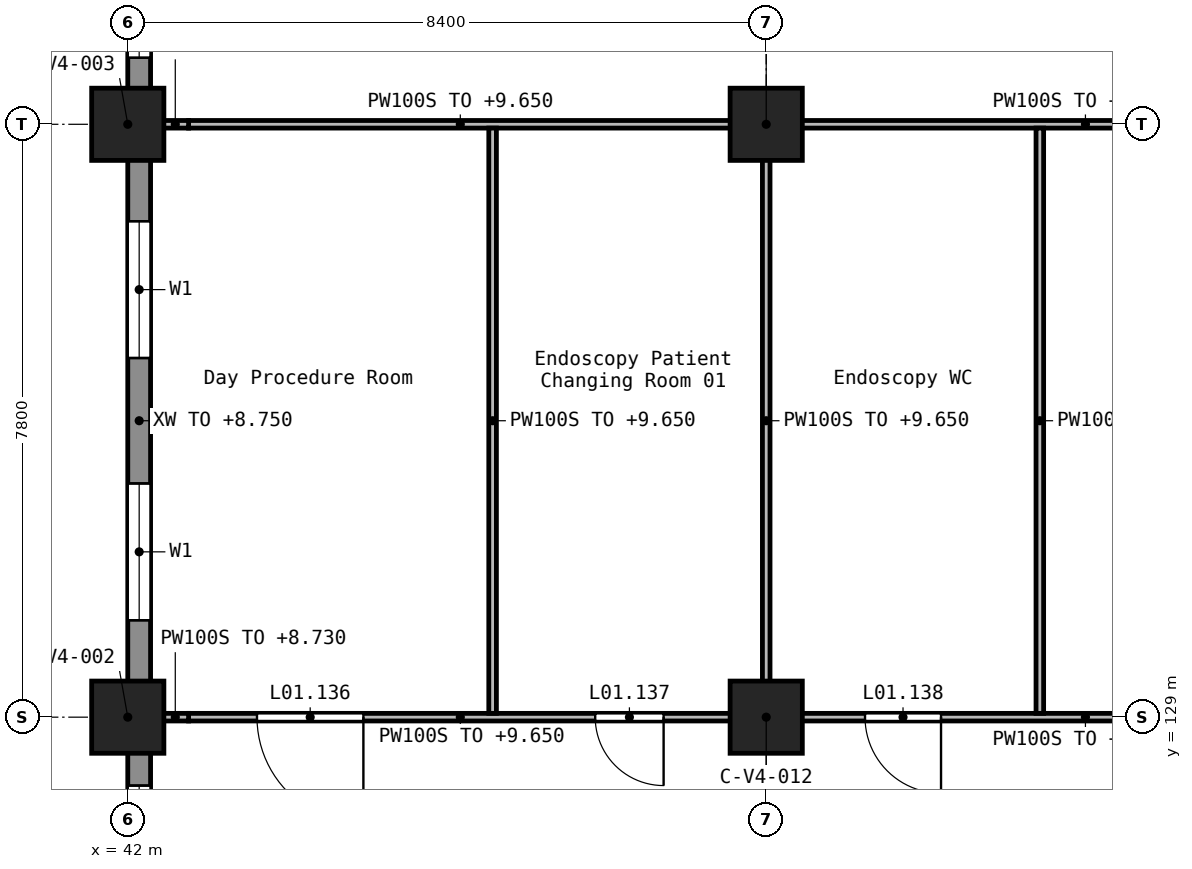
"""IFC4 building model, lengths in metres.
Left out: names, types, materials, properties, quantities, classifications, styles, units other than length and angle.
Written with IfcOpenShell. Run it as: python <this file> out.ifc"""

import sys

from ifc_helpers import new_model, si_unit, direction, frame, frame_2d, origin, origin_2d, place, context, subcontext, project, spatial, rectangle, extrude, element, fill, save


model = new_model("IFC4")
c1 = context("Model", 3, precision=1e-05, world=origin(), true_north=direction((0.0, 1.0)))
c2 = subcontext(c1, "Body", "Model", "MODEL_VIEW")
j1 = project(units=[si_unit("LENGTHUNIT", "METRE"), si_unit("PLANEANGLEUNIT", "RADIAN")], contexts=[c1])
p1 = place(None, origin())
s1 = spatial("IfcSite", under=j1, at=p1, CompositionType="ELEMENT")
p2 = place(p1, origin())
s2 = spatial("IfcBuilding", under=s1, at=p2, CompositionType="ELEMENT")
p3 = place(p2, frame((0.0, 0.0, 5.4)))
s3 = spatial("IfcBuildingStorey", under=s2, at=p3, CompositionType="ELEMENT", Elevation=5.4)
for number, where, z_axis, x_axis in (
    (1, (42.0, 129.0, 0.0), (0.0, 0.0, 1.0), (1.0, 0.0, 0.0)),
    (2, (42.0, 136.8, 0.0), (0.0, 0.0, 1.0), (1.0, 0.0, 0.0)),
    (3, (50.4, 129.0, 0.0), (0.0, 0.0, 1.0), (1.0, 0.0, 0.0)),
    (4, (50.4, 136.8, 0.0), (0.0, 0.0, 1.0), (1.0, 0.0, 0.0)),
):
    element("IfcColumn", number, at=place(p3, frame(where, z_axis=z_axis, x_axis=x_axis)), inside=s3, PredefinedType="COLUMN", context=c2, shape_type="SweptSolid", body=[
        extrude(rectangle(XDim=0.95, YDim=0.95, at=origin_2d()), origin(), (0.0, 0.0, 1.0), 4.5),
    ])
p4 = place(p3, frame((42.15, 139.9, 0.0), z_axis=(0.0, 0.0, 1.0), x_axis=(0.0, -1.0, 0.0)))
e5 = element("IfcWall", 5, at=p4, inside=s3, PredefinedType="STANDARD", context=c2, shape_type="SweptSolid", body=[
    extrude(rectangle(XDim=2.65, YDim=0.3, at=frame_2d((1.325, 0.0))), origin(), (0.0, 0.0, 1.0), 3.35),
])
p5 = place(p4, frame((0.425, 0.0, 0.9)))
e6 = element("IfcOpeningElement", 6, at=p5, cuts=e5, PredefinedType="OPENING", context=c2, shape_type="SweptSolid", body=[
    extrude(rectangle(XDim=1.8, YDim=1.5, at=frame_2d((0.9, 0.75))), frame((0.0, 0.16, 0.0), z_axis=(0.0, -1.0, 0.0), x_axis=(1.0, 0.0, 0.0)), (0.0, 0.0, 1.0), 0.32),
])
p6 = place(p3, frame((42.15, 136.35, 0.0), z_axis=(0.0, 0.0, 1.0), x_axis=(0.0, -1.0, 0.0)))
e7 = element("IfcWall", 7, at=p6, inside=s3, PredefinedType="STANDARD", context=c2, shape_type="SweptSolid", body=[
    extrude(rectangle(XDim=6.9, YDim=0.3, at=frame_2d((3.45, 0.0))), origin(), (0.0, 0.0, 1.0), 3.35),
])
p7 = place(p6, frame((0.825, 0.0, 0.9)))
e8 = element("IfcOpeningElement", 8, at=p7, cuts=e7, PredefinedType="OPENING", context=c2, shape_type="SweptSolid", body=[
    extrude(rectangle(XDim=1.8, YDim=1.5, at=frame_2d((0.9, 0.75))), frame((0.0, 0.16, 0.0), z_axis=(0.0, -1.0, 0.0), x_axis=(1.0, 0.0, 0.0)), (0.0, 0.0, 1.0), 0.32),
])
p8 = place(p6, frame((4.275, 0.0, 0.9)))
e9 = element("IfcOpeningElement", 9, at=p8, cuts=e7, PredefinedType="OPENING", context=c2, shape_type="SweptSolid", body=[
    extrude(rectangle(XDim=1.8, YDim=1.5, at=frame_2d((0.9, 0.75))), frame((0.0, 0.16, 0.0), z_axis=(0.0, -1.0, 0.0), x_axis=(1.0, 0.0, 0.0)), (0.0, 0.0, 1.0), 0.32),
])
p9 = place(p3, frame((42.15, 128.55, 0.0), z_axis=(0.0, 0.0, 1.0), x_axis=(0.0, -1.0, 0.0)))
e10 = element("IfcWall", 10, at=p9, inside=s3, PredefinedType="STANDARD", context=c2, shape_type="SweptSolid", body=[
    extrude(rectangle(XDim=2.7, YDim=0.3, at=frame_2d((1.35, 0.0))), origin(), (0.0, 0.0, 1.0), 3.35),
])
p10 = place(p9, frame((0.45, 0.0, 0.9)))
e11 = element("IfcOpeningElement", 11, at=p10, cuts=e10, PredefinedType="OPENING", context=c2, shape_type="SweptSolid", body=[
    extrude(rectangle(XDim=1.8, YDim=1.5, at=frame_2d((0.9, 0.75))), frame((0.0, 0.16, 0.0), z_axis=(0.0, -1.0, 0.0), x_axis=(1.0, 0.0, 0.0)), (0.0, 0.0, 1.0), 0.32),
])
p11 = place(p3, frame((58.35, 129.0, 0.0), z_axis=(0.0, 0.0, 1.0), x_axis=(-1.0, 0.0, 0.0)))
e12 = element("IfcWall", 12, at=p11, inside=s3, PredefinedType="PARTITIONING", context=c2, shape_type="SweptSolid", body=[
    extrude(rectangle(XDim=7.5, YDim=0.1, at=frame_2d((3.75, 0.0))), origin(), (0.0, 0.0, 1.0), 4.25),
])
p12 = place(p11, frame((5.65, 0.0, 0.0)))
e13 = element("IfcOpeningElement", 13, at=p12, cuts=e12, PredefinedType="OPENING", context=c2, shape_type="SweptSolid", body=[
    extrude(rectangle(XDim=1.0, YDim=2.1, at=frame_2d((0.5, 1.05))), frame((0.0, 0.06, 0.0), z_axis=(0.0, -1.0, 0.0), x_axis=(1.0, 0.0, 0.0)), (0.0, 0.0, 1.0), 0.12),
])
p13 = place(p3, frame((49.95, 129.0, 0.0), z_axis=(0.0, 0.0, 1.0), x_axis=(-1.0, 0.0, 0.0)))
e14 = element("IfcWall", 14, at=p13, inside=s3, PredefinedType="PARTITIONING", context=c2, shape_type="SweptSolid", body=[
    extrude(rectangle(XDim=7.15, YDim=0.1, at=frame_2d((3.575, 0.0))), origin(), (0.0, 0.0, 1.0), 4.25),
])
p14 = place(p13, frame((4.85, 0.0, 0.0)))
e15 = element("IfcOpeningElement", 15, at=p14, cuts=e14, PredefinedType="OPENING", context=c2, shape_type="SweptSolid", body=[
    extrude(rectangle(XDim=1.4, YDim=2.1, at=frame_2d((0.7, 1.05))), frame((0.0, 0.06, 0.0), z_axis=(0.0, -1.0, 0.0), x_axis=(1.0, 0.0, 0.0)), (0.0, 0.0, 1.0), 0.12),
])
p15 = place(p13, frame((0.9, 0.0, 0.0)))
e16 = element("IfcOpeningElement", 16, at=p15, cuts=e14, PredefinedType="OPENING", context=c2, shape_type="SweptSolid", body=[
    extrude(rectangle(XDim=0.9, YDim=2.1, at=frame_2d((0.45, 1.05))), frame((0.0, 0.06, 0.0), z_axis=(0.0, -1.0, 0.0), x_axis=(1.0, 0.0, 0.0)), (0.0, 0.0, 1.0), 0.12),
])
p16 = place(p3, frame((42.8, 129.0, 0.0), z_axis=(0.0, 0.0, 1.0), x_axis=(-1.0, 0.0, 0.0)))
e17 = element("IfcWall", 17, at=p16, inside=s3, PredefinedType="PARTITIONING", context=c2, shape_type="SweptSolid", body=[
    extrude(rectangle(XDim=0.35, YDim=0.1, at=frame_2d((0.175, 0.0))), origin(), (0.0, 0.0, 1.0), 3.33),
])
p17 = place(p3, frame((58.35, 136.8, 0.0), z_axis=(0.0, 0.0, 1.0), x_axis=(-1.0, 0.0, 0.0)))
e18 = element("IfcWall", 18, at=p17, inside=s3, PredefinedType="PARTITIONING", context=c2, shape_type="SweptSolid", body=[
    extrude(rectangle(XDim=7.5, YDim=0.1, at=frame_2d((3.75, 0.0))), origin(), (0.0, 0.0, 1.0), 4.25),
])
p18 = place(p3, frame((49.95, 136.8, 0.0), z_axis=(0.0, 0.0, 1.0), x_axis=(-1.0, 0.0, 0.0)))
e19 = element("IfcWall", 19, at=p18, inside=s3, PredefinedType="PARTITIONING", context=c2, shape_type="SweptSolid", body=[
    extrude(rectangle(XDim=7.15, YDim=0.1, at=frame_2d((3.575, 0.0))), origin(), (0.0, 0.0, 1.0), 4.25),
])
p19 = place(p3, frame((42.8, 136.8, 0.0), z_axis=(0.0, 0.0, 1.0), x_axis=(-1.0, 0.0, 0.0)))
e20 = element("IfcWall", 20, at=p19, inside=s3, PredefinedType="PARTITIONING", context=c2, shape_type="SweptSolid", body=[
    extrude(rectangle(XDim=0.35, YDim=0.1, at=frame_2d((0.175, 0.0))), origin(), (0.0, 0.0, 1.0), 3.33),
])
p20 = place(p3, frame((46.8, 129.05, 0.0), z_axis=(0.0, 0.0, 1.0), x_axis=(0.0, 1.0, 0.0)))
e21 = element("IfcWall", 21, at=p20, inside=s3, PredefinedType="PARTITIONING", context=c2, shape_type="SweptSolid", body=[
    extrude(rectangle(XDim=7.7, YDim=0.1, at=frame_2d((3.85, 0.0))), origin(), (0.0, 0.0, 1.0), 4.25),
])
p21 = place(p3, frame((50.4, 129.45, 0.0), z_axis=(0.0, 0.0, 1.0), x_axis=(0.0, 1.0, 0.0)))
e22 = element("IfcWall", 22, at=p21, inside=s3, PredefinedType="PARTITIONING", context=c2, shape_type="SweptSolid", body=[
    extrude(rectangle(XDim=6.9, YDim=0.1, at=frame_2d((3.45, 0.0))), origin(), (0.0, 0.0, 1.0), 4.25),
])
p22 = place(p3, frame((54.0, 129.05, 0.0), z_axis=(0.0, 0.0, 1.0), x_axis=(0.0, 1.0, 0.0)))
e23 = element("IfcWall", 23, at=p22, inside=s3, PredefinedType="PARTITIONING", context=c2, shape_type="SweptSolid", body=[
    extrude(rectangle(XDim=7.7, YDim=0.1, at=frame_2d((3.85, 0.0))), origin(), (0.0, 0.0, 1.0), 4.25),
])
p23 = place(p5, origin())
e24 = element("IfcWindow", 24, at=p23, inside=s3, PartitioningType="SINGLE_PANEL", PredefinedType="WINDOW", context=c2, shape_type="SweptSolid", body=[
    extrude(rectangle(XDim=1.8, YDim=1.5, at=frame_2d((0.9, 0.75))), frame((0.0, 0.03, 0.0), z_axis=(0.0, -1.0, 0.0), x_axis=(1.0, 0.0, 0.0)), (0.0, 0.0, 1.0), 0.06),
])
fill(e6, e24)
p24 = place(p7, origin())
e25 = element("IfcWindow", 25, at=p24, inside=s3, PartitioningType="SINGLE_PANEL", PredefinedType="WINDOW", context=c2, shape_type="SweptSolid", body=[
    extrude(rectangle(XDim=1.8, YDim=1.5, at=frame_2d((0.9, 0.75))), frame((0.0, 0.03, 0.0), z_axis=(0.0, -1.0, 0.0), x_axis=(1.0, 0.0, 0.0)), (0.0, 0.0, 1.0), 0.06),
])
fill(e8, e25)
p25 = place(p8, origin())
e26 = element("IfcWindow", 26, at=p25, inside=s3, PartitioningType="SINGLE_PANEL", PredefinedType="WINDOW", context=c2, shape_type="SweptSolid", body=[
    extrude(rectangle(XDim=1.8, YDim=1.5, at=frame_2d((0.9, 0.75))), frame((0.0, 0.03, 0.0), z_axis=(0.0, -1.0, 0.0), x_axis=(1.0, 0.0, 0.0)), (0.0, 0.0, 1.0), 0.06),
])
fill(e9, e26)
p26 = place(p10, origin())
e27 = element("IfcWindow", 27, at=p26, inside=s3, PartitioningType="SINGLE_PANEL", PredefinedType="WINDOW", context=c2, shape_type="SweptSolid", body=[
    extrude(rectangle(XDim=1.8, YDim=1.5, at=frame_2d((0.9, 0.75))), frame((0.0, 0.03, 0.0), z_axis=(0.0, -1.0, 0.0), x_axis=(1.0, 0.0, 0.0)), (0.0, 0.0, 1.0), 0.06),
])
fill(e11, e27)
p27 = place(p14, frame((1.4, 0.0, 0.0), z_axis=(0.0, 0.0, 1.0), x_axis=(-1.0, 0.0, 0.0)))
e28 = element("IfcDoor", 28, at=p27, inside=s3, OperationType="DOUBLE_DOOR_SINGLE_SWING", PredefinedType="DOOR", context=c2, shape_type="SweptSolid", body=[
    extrude(rectangle(XDim=1.4, YDim=2.1, at=frame_2d((0.7, 1.05))), frame((0.0, 0.025, 0.0), z_axis=(0.0, -1.0, 0.0), x_axis=(1.0, 0.0, 0.0)), (0.0, 0.0, 1.0), 0.05),
])
fill(e15, e28)
p28 = place(p15, frame((0.9, 0.0, 0.0), z_axis=(0.0, 0.0, 1.0), x_axis=(-1.0, 0.0, 0.0)))
e29 = element("IfcDoor", 29, at=p28, inside=s3, OperationType="SINGLE_SWING_RIGHT", PredefinedType="DOOR", context=c2, shape_type="SweptSolid", body=[
    extrude(rectangle(XDim=0.9, YDim=2.1, at=frame_2d((0.45, 1.05))), frame((0.0, 0.025, 0.0), z_axis=(0.0, -1.0, 0.0), x_axis=(1.0, 0.0, 0.0)), (0.0, 0.0, 1.0), 0.05),
])
fill(e16, e29)
p29 = place(p12, frame((1.0, 0.0, 0.0), z_axis=(0.0, 0.0, 1.0), x_axis=(-1.0, 0.0, 0.0)))
e30 = element("IfcDoor", 30, at=p29, inside=s3, OperationType="SINGLE_SWING_LEFT", PredefinedType="DOOR", context=c2, shape_type="SweptSolid", body=[
    extrude(rectangle(XDim=1.0, YDim=2.1, at=frame_2d((0.5, 1.05))), frame((0.0, 0.025, 0.0), z_axis=(0.0, -1.0, 0.0), x_axis=(1.0, 0.0, 0.0)), (0.0, 0.0, 1.0), 0.05),
])
fill(e13, e30)
save(model, sys.argv[1])
